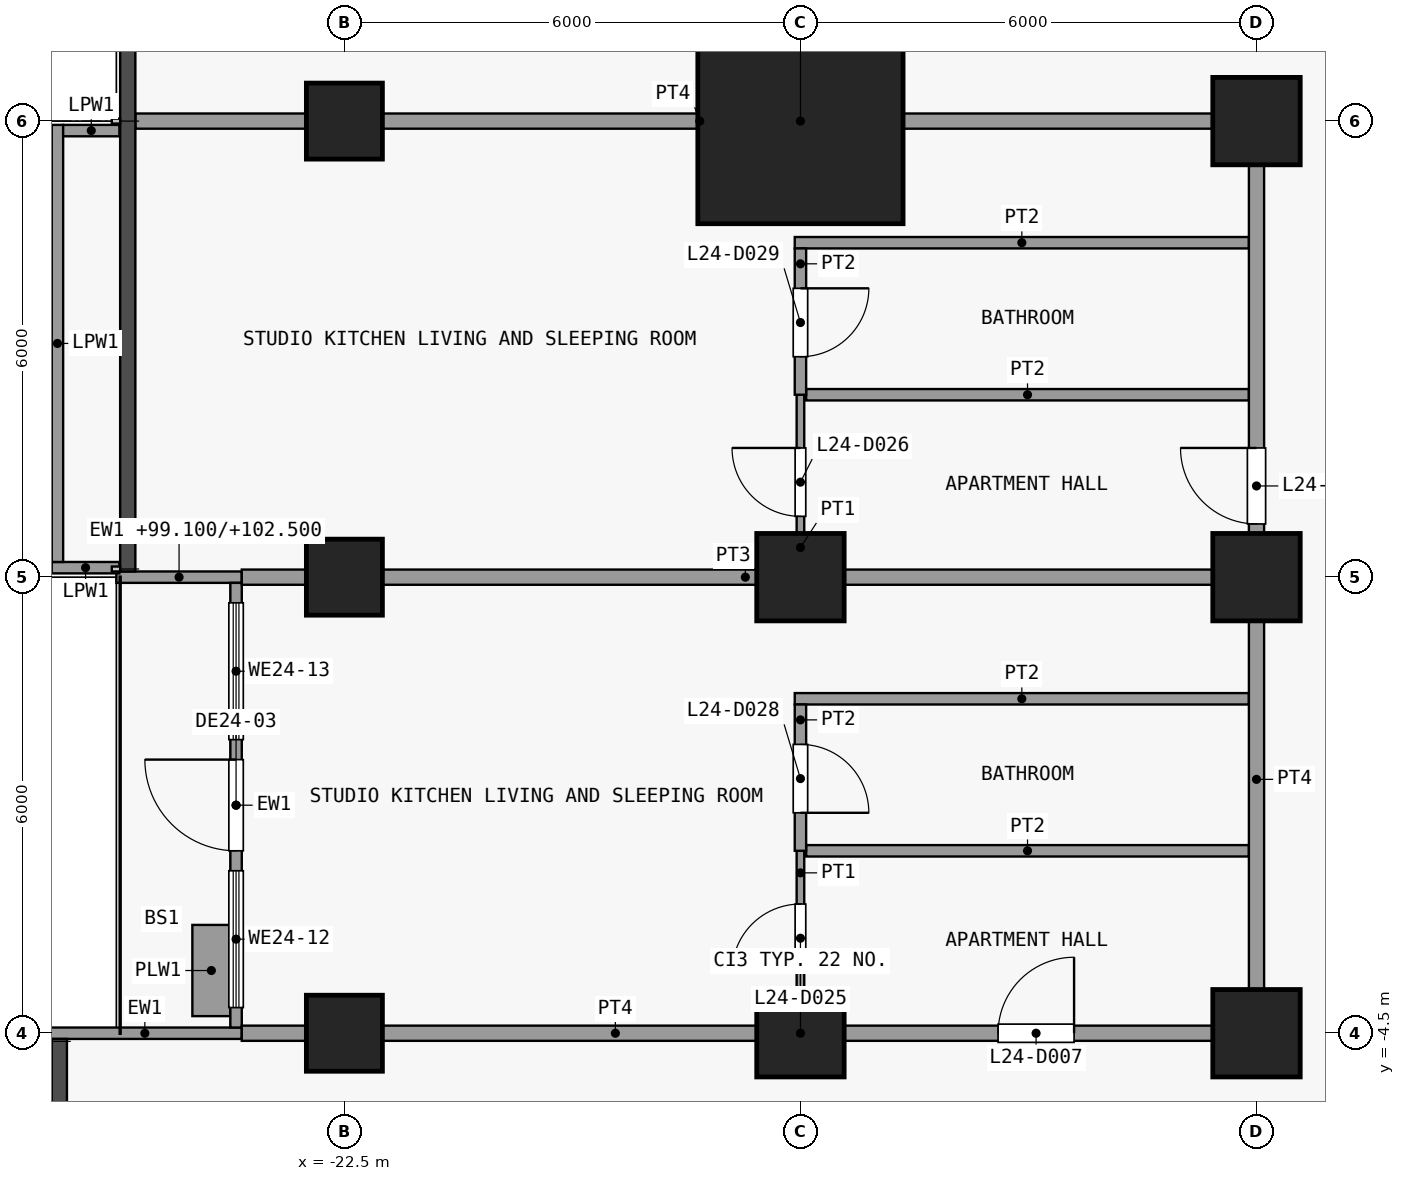
"""IFC4 building model, lengths in metres.
Left out: names, types, materials, properties, quantities, classifications, styles, units other than length and angle.
Written with IfcOpenShell. Run it as: python <this file> out.ifc"""

import sys

from ifc_helpers import new_model, si_unit, direction, frame, frame_2d, origin, origin_2d, place, context, subcontext, project, spatial, rectangle, extrude, element, fill, save


model = new_model("IFC4")
c1 = context("Model", 3, precision=1e-05, world=origin(), true_north=direction((0.0, 1.0)))
c2 = subcontext(c1, "Body", "Model", "MODEL_VIEW")
j1 = project(units=[si_unit("LENGTHUNIT", "METRE"), si_unit("PLANEANGLEUNIT", "RADIAN")], contexts=[c1])
p1 = place(None, origin())
s1 = spatial("IfcSite", under=j1, at=p1, CompositionType="ELEMENT")
p2 = place(p1, origin())
s2 = spatial("IfcBuilding", under=s1, at=p2, CompositionType="ELEMENT")
p3 = place(p2, frame((0.0, 0.0, 99.1)))
s3 = spatial("IfcBuildingStorey", under=s2, at=p3, CompositionType="ELEMENT", Elevation=99.1)
for number, where, z_axis, x_axis in (
    (1, (-22.5, -4.5, 0.0), (0.0, 0.0, 1.0), (1.0, 0.0, 0.0)),
    (2, (-22.5, 1.5, 0.0), (0.0, 0.0, 1.0), (1.0, 0.0, 0.0)),
    (3, (-22.5, 7.5, 0.0), (0.0, 0.0, 1.0), (1.0, 0.0, 0.0)),
):
    element("IfcColumn", number, at=place(p3, frame(where, z_axis=z_axis, x_axis=x_axis)), inside=s3, PredefinedType="COLUMN", context=c2, shape_type="SweptSolid", body=[
        extrude(rectangle(XDim=1.0, YDim=1.0, at=origin_2d()), origin(), (0.0, 0.0, 1.0), 3.6),
    ])
for number, where, z_axis, x_axis in (
    (4, (-16.5, -4.5, 0.0), (0.0, 0.0, 1.0), (1.0, 0.0, 0.0)),
    (5, (-16.5, 1.5, 0.0), (0.0, 0.0, 1.0), (1.0, 0.0, 0.0)),
):
    element("IfcColumn", number, at=place(p3, frame(where, z_axis=z_axis, x_axis=x_axis)), inside=s3, PredefinedType="COLUMN", context=c2, shape_type="SweptSolid", body=[
        extrude(rectangle(XDim=1.15, YDim=1.15, at=origin_2d()), origin(), (0.0, 0.0, 1.0), 3.6),
    ])
p4 = place(p3, frame((-16.5, 7.5, 0.0), z_axis=(0.0, 0.0, 1.0), x_axis=(1.0, 0.0, 0.0)))
e6 = element("IfcColumn", 6, at=p4, inside=s3, PredefinedType="COLUMN", context=c2, shape_type="SweptSolid", body=[
    extrude(rectangle(XDim=2.7, YDim=2.7, at=origin_2d()), origin(), (0.0, 0.0, 1.0), 3.6),
])
for number, where, z_axis, x_axis in (
    (7, (-10.5, -4.5, 0.0), (0.0, 0.0, 1.0), (1.0, 0.0, 0.0)),
    (8, (-10.5, 1.5, 0.0), (0.0, 0.0, 1.0), (1.0, 0.0, 0.0)),
    (9, (-10.5, 7.5, 0.0), (0.0, 0.0, 1.0), (1.0, 0.0, 0.0)),
):
    element("IfcColumn", number, at=place(p3, frame(where, z_axis=z_axis, x_axis=x_axis)), inside=s3, PredefinedType="COLUMN", context=c2, shape_type="SweptSolid", body=[
        extrude(rectangle(XDim=1.15, YDim=1.15, at=origin_2d()), origin(), (0.0, 0.0, 1.0), 3.6),
    ])
p5 = place(p3, frame((-23.85, -4.5, 0.0), z_axis=(0.0, 0.0, 1.0), x_axis=(-1.0, 0.0, 0.0)))
e10 = element("IfcWall", 10, at=p5, inside=s3, PredefinedType="SOLIDWALL", context=c2, shape_type="SweptSolid", body=[
    extrude(rectangle(XDim=2.55, YDim=0.15, at=frame_2d((1.275, 0.0))), origin(), (0.0, 0.0, 1.0), 3.3),
])
p6 = place(p3, frame((-23.85, 1.5, 0.0), z_axis=(0.0, 0.0, 1.0), x_axis=(-1.0, 0.0, 0.0)))
e11 = element("IfcWall", 11, at=p6, inside=s3, PredefinedType="SOLIDWALL", context=c2, shape_type="SweptSolid", body=[
    extrude(rectangle(XDim=1.65, YDim=0.15, at=frame_2d((0.825, 0.0))), origin(), (0.0, 0.0, 1.0), 3.4),
])
p7 = place(p3, frame((-23.925, -4.425, 0.0), z_axis=(0.0, 0.0, 1.0), x_axis=(0.0, 1.0, 0.0)))
e12 = element("IfcWall", 12, at=p7, inside=s3, PredefinedType="SOLIDWALL", context=c2, shape_type="SweptSolid", body=[
    extrude(rectangle(XDim=5.85, YDim=0.15, at=frame_2d((2.925, 0.0))), origin(), (0.0, 0.0, 1.0), 3.3),
])
p8 = place(p7, frame((2.325, 0.0, 0.0)))
e13 = element("IfcOpeningElement", 13, at=p8, cuts=e12, PredefinedType="OPENING", context=c2, shape_type="SweptSolid", body=[
    extrude(rectangle(XDim=1.2, YDim=2.4, at=frame_2d((0.6, 1.2))), frame((0.0, 0.085, 0.0), z_axis=(0.0, -1.0, 0.0), x_axis=(1.0, 0.0, 0.0)), (0.0, 0.0, 1.0), 0.17),
])
p9 = place(p7, frame((0.262, 0.0, 0.9)))
e14 = element("IfcOpeningElement", 14, at=p9, cuts=e12, PredefinedType="OPENING", context=c2, shape_type="SweptSolid", body=[
    extrude(rectangle(XDim=1.8, YDim=2.1, at=frame_2d((0.9, 1.05))), frame((0.0, 0.085, 0.0), z_axis=(0.0, -1.0, 0.0), x_axis=(1.0, 0.0, 0.0)), (0.0, 0.0, 1.0), 0.17),
])
p10 = place(p7, frame((3.788, 0.0, 0.9)))
e15 = element("IfcOpeningElement", 15, at=p10, cuts=e12, PredefinedType="OPENING", context=c2, shape_type="SweptSolid", body=[
    extrude(rectangle(XDim=1.8, YDim=2.1, at=frame_2d((0.9, 1.05))), frame((0.0, 0.085, 0.0), z_axis=(0.0, -1.0, 0.0), x_axis=(1.0, 0.0, 0.0)), (0.0, 0.0, 1.0), 0.17),
])
p11 = place(p3, frame((-24.25, -4.275, 0.0), z_axis=(0.0, 0.0, 1.0), x_axis=(0.0, 1.0, 0.0)))
e16 = element("IfcWall", 16, at=p11, inside=s3, PredefinedType="USERDEFINED", context=c2, shape_type="SweptSolid", body=[
    extrude(rectangle(XDim=1.2, YDim=0.5, at=frame_2d((0.6, 0.0))), origin(), (0.0, 0.0, 1.0), 0.9),
])
p12 = place(p3, frame((-25.46, 1.625, 0.0), z_axis=(0.0, 0.0, 1.0), x_axis=(-1.0, 0.0, 0.0)))
e17 = element("IfcWall", 17, at=p12, inside=s3, PredefinedType="PARAPET", context=c2, shape_type="SweptSolid", body=[
    extrude(rectangle(XDim=0.89, YDim=0.15, at=frame_2d((0.445, 0.0))), origin(), (0.0, 0.0, 1.0), 1.15),
])
p13 = place(p3, frame((-26.275, 1.7, 0.0), z_axis=(0.0, 0.0, 1.0), x_axis=(0.0, 1.0, 0.0)))
e18 = element("IfcWall", 18, at=p13, inside=s3, PredefinedType="PARAPET", context=c2, shape_type="SweptSolid", body=[
    extrude(rectangle(XDim=5.75, YDim=0.15, at=frame_2d((2.875, 0.0))), origin(), (0.0, 0.0, 1.0), 1.15),
])
p14 = place(p3, frame((-26.2, 7.375, 0.0), z_axis=(0.0, 0.0, 1.0), x_axis=(1.0, 0.0, 0.0)))
e19 = element("IfcWall", 19, at=p14, inside=s3, PredefinedType="PARAPET", context=c2, shape_type="SweptSolid", body=[
    extrude(rectangle(XDim=0.74, YDim=0.15, at=frame_2d((0.37, 0.0))), origin(), (0.0, 0.0, 1.0), 1.15),
])
p15 = place(p3, frame((-23.85, -4.5, 0.0), z_axis=(0.0, 0.0, 1.0), x_axis=(1.0, 0.0, 0.0)))
e20 = element("IfcWall", 20, at=p15, inside=s3, PredefinedType="PARTITIONING", context=c2, shape_type="SweptSolid", body=[
    extrude(rectangle(XDim=13.45, YDim=0.2, at=frame_2d((6.725, 0.0))), origin(), (0.0, 0.0, 1.0), 3.3),
])
p16 = place(p15, frame((9.95, 0.0, 0.0)))
e21 = element("IfcOpeningElement", 21, at=p16, cuts=e20, PredefinedType="OPENING", context=c2, shape_type="SweptSolid", body=[
    extrude(rectangle(XDim=1.0, YDim=2.1, at=frame_2d((0.5, 1.05))), frame((0.0, 0.11, 0.0), z_axis=(0.0, -1.0, 0.0), x_axis=(1.0, 0.0, 0.0)), (0.0, 0.0, 1.0), 0.22),
])
p17 = place(p3, frame((-16.425, -2.1, 0.0), z_axis=(0.0, 0.0, 1.0), x_axis=(1.0, 0.0, 0.0)))
e22 = element("IfcWall", 22, at=p17, inside=s3, PredefinedType="PARTITIONING", context=c2, shape_type="SweptSolid", body=[
    extrude(rectangle(XDim=5.825, YDim=0.15, at=frame_2d((2.913, 0.0))), origin(), (0.0, 0.0, 1.0), 3.3),
])
p18 = place(p3, frame((-16.575, -0.1, 0.0), z_axis=(0.0, 0.0, 1.0), x_axis=(1.0, 0.0, 0.0)))
e23 = element("IfcWall", 23, at=p18, inside=s3, PredefinedType="PARTITIONING", context=c2, shape_type="SweptSolid", body=[
    extrude(rectangle(XDim=5.975, YDim=0.15, at=frame_2d((2.987, 0.0))), origin(), (0.0, 0.0, 1.0), 3.3),
])
p19 = place(p3, frame((-23.85, 1.5, 0.0), z_axis=(0.0, 0.0, 1.0), x_axis=(1.0, 0.0, 0.0)))
e24 = element("IfcWall", 24, at=p19, inside=s3, PredefinedType="PARTITIONING", context=c2, shape_type="SweptSolid", body=[
    extrude(rectangle(XDim=13.25, YDim=0.2, at=frame_2d((6.625, 0.0))), origin(), (0.0, 0.0, 1.0), 3.3),
])
p20 = place(p3, frame((-16.425, 3.9, 0.0), z_axis=(0.0, 0.0, 1.0), x_axis=(1.0, 0.0, 0.0)))
e25 = element("IfcWall", 25, at=p20, inside=s3, PredefinedType="PARTITIONING", context=c2, shape_type="SweptSolid", body=[
    extrude(rectangle(XDim=5.825, YDim=0.15, at=frame_2d((2.913, 0.0))), origin(), (0.0, 0.0, 1.0), 3.3),
])
p21 = place(p3, frame((-16.575, 5.9, 0.0), z_axis=(0.0, 0.0, 1.0), x_axis=(1.0, 0.0, 0.0)))
e26 = element("IfcWall", 26, at=p21, inside=s3, PredefinedType="PARTITIONING", context=c2, shape_type="SweptSolid", body=[
    extrude(rectangle(XDim=5.975, YDim=0.15, at=frame_2d((2.987, 0.0))), origin(), (0.0, 0.0, 1.0), 3.3),
])
p22 = place(p3, frame((-25.25, 7.5, 0.0), z_axis=(0.0, 0.0, 1.0), x_axis=(1.0, 0.0, 0.0)))
e27 = element("IfcWall", 27, at=p22, inside=s3, PredefinedType="PARTITIONING", context=c2, shape_type="SweptSolid", body=[
    extrude(rectangle(XDim=14.85, YDim=0.2, at=frame_2d((7.425, 0.0))), origin(), (0.0, 0.0, 1.0), 3.3),
])
p23 = place(p3, frame((-16.5, -4.4, 0.0), z_axis=(0.0, 0.0, 1.0), x_axis=(0.0, 1.0, 0.0)))
e28 = element("IfcWall", 28, at=p23, inside=s3, PredefinedType="PARTITIONING", context=c2, shape_type="SweptSolid", body=[
    extrude(rectangle(XDim=2.3, YDim=0.1, at=frame_2d((1.15, 0.0))), origin(), (0.0, 0.0, 1.0), 3.3),
])
p24 = place(p23, frame((0.7, 0.0, 0.0)))
e29 = element("IfcOpeningElement", 29, at=p24, cuts=e28, PredefinedType="OPENING", context=c2, shape_type="SweptSolid", body=[
    extrude(rectangle(XDim=0.9, YDim=2.1, at=frame_2d((0.45, 1.05))), frame((0.0, 0.06, 0.0), z_axis=(0.0, -1.0, 0.0), x_axis=(1.0, 0.0, 0.0)), (0.0, 0.0, 1.0), 0.12),
])
p25 = place(p3, frame((-16.5, 1.6, 0.0), z_axis=(0.0, 0.0, 1.0), x_axis=(0.0, 1.0, 0.0)))
e30 = element("IfcWall", 30, at=p25, inside=s3, PredefinedType="PARTITIONING", context=c2, shape_type="SweptSolid", body=[
    extrude(rectangle(XDim=2.3, YDim=0.1, at=frame_2d((1.15, 0.0))), origin(), (0.0, 0.0, 1.0), 3.3),
])
p26 = place(p25, frame((0.7, 0.0, 0.0)))
e31 = element("IfcOpeningElement", 31, at=p26, cuts=e30, PredefinedType="OPENING", context=c2, shape_type="SweptSolid", body=[
    extrude(rectangle(XDim=0.9, YDim=2.1, at=frame_2d((0.45, 1.05))), frame((0.0, 0.06, 0.0), z_axis=(0.0, -1.0, 0.0), x_axis=(1.0, 0.0, 0.0)), (0.0, 0.0, 1.0), 0.12),
])
p27 = place(p3, frame((-16.5, -2.1, 0.0), z_axis=(0.0, 0.0, 1.0), x_axis=(0.0, 1.0, 0.0)))
e32 = element("IfcWall", 32, at=p27, inside=s3, PredefinedType="PARTITIONING", context=c2, shape_type="SweptSolid", body=[
    extrude(rectangle(XDim=1.925, YDim=0.15, at=frame_2d((0.962, 0.0))), origin(), (0.0, 0.0, 1.0), 3.3),
])
p28 = place(p27, frame((0.5, 0.0, 0.0)))
e33 = element("IfcOpeningElement", 33, at=p28, cuts=e32, PredefinedType="OPENING", context=c2, shape_type="SweptSolid", body=[
    extrude(rectangle(XDim=0.9, YDim=2.1, at=frame_2d((0.45, 1.05))), frame((0.0, 0.085, 0.0), z_axis=(0.0, -1.0, 0.0), x_axis=(1.0, 0.0, 0.0)), (0.0, 0.0, 1.0), 0.17),
])
p29 = place(p3, frame((-16.5, 3.9, 0.0), z_axis=(0.0, 0.0, 1.0), x_axis=(0.0, 1.0, 0.0)))
e34 = element("IfcWall", 34, at=p29, inside=s3, PredefinedType="PARTITIONING", context=c2, shape_type="SweptSolid", body=[
    extrude(rectangle(XDim=1.925, YDim=0.15, at=frame_2d((0.962, 0.0))), origin(), (0.0, 0.0, 1.0), 3.3),
])
p30 = place(p29, frame((0.5, 0.0, 0.0)))
e35 = element("IfcOpeningElement", 35, at=p30, cuts=e34, PredefinedType="OPENING", context=c2, shape_type="SweptSolid", body=[
    extrude(rectangle(XDim=0.9, YDim=2.1, at=frame_2d((0.45, 1.05))), frame((0.0, 0.085, 0.0), z_axis=(0.0, -1.0, 0.0), x_axis=(1.0, 0.0, 0.0)), (0.0, 0.0, 1.0), 0.17),
])
p31 = place(p3, frame((-10.5, -4.4, 0.0), z_axis=(0.0, 0.0, 1.0), x_axis=(0.0, 1.0, 0.0)))
e36 = element("IfcWall", 36, at=p31, inside=s3, PredefinedType="PARTITIONING", context=c2, shape_type="SweptSolid", body=[
    extrude(rectangle(XDim=11.8, YDim=0.2, at=frame_2d((5.9, 0.0))), origin(), (0.0, 0.0, 1.0), 3.3),
])
p32 = place(p31, frame((6.6, 0.0, 0.0)))
e37 = element("IfcOpeningElement", 37, at=p32, cuts=e36, PredefinedType="OPENING", context=c2, shape_type="SweptSolid", body=[
    extrude(rectangle(XDim=1.0, YDim=2.1, at=frame_2d((0.5, 1.05))), frame((0.0, 0.11, 0.0), z_axis=(0.0, -1.0, 0.0), x_axis=(1.0, 0.0, 0.0)), (0.0, 0.0, 1.0), 0.22),
])
p33 = place(p8, origin())
e38 = element("IfcDoor", 38, at=p33, inside=s3, OperationType="SINGLE_SWING_RIGHT", PredefinedType="DOOR", context=c2, shape_type="SweptSolid", body=[
    extrude(rectangle(XDim=1.2, YDim=2.4, at=frame_2d((0.6, 1.2))), frame((0.0, 0.025, 0.0), z_axis=(0.0, -1.0, 0.0), x_axis=(1.0, 0.0, 0.0)), (0.0, 0.0, 1.0), 0.05),
])
fill(e13, e38)
p34 = place(p9, origin())
e39 = element("IfcWindow", 39, at=p34, inside=s3, PartitioningType="SINGLE_PANEL", PredefinedType="WINDOW", context=c2, shape_type="SweptSolid", body=[
    extrude(rectangle(XDim=1.8, YDim=2.1, at=frame_2d((0.9, 1.05))), frame((0.0, 0.03, 0.0), z_axis=(0.0, -1.0, 0.0), x_axis=(1.0, 0.0, 0.0)), (0.0, 0.0, 1.0), 0.06),
])
fill(e14, e39)
p35 = place(p10, origin())
e40 = element("IfcWindow", 40, at=p35, inside=s3, PartitioningType="SINGLE_PANEL", PredefinedType="WINDOW", context=c2, shape_type="SweptSolid", body=[
    extrude(rectangle(XDim=1.8, YDim=2.1, at=frame_2d((0.9, 1.05))), frame((0.0, 0.03, 0.0), z_axis=(0.0, -1.0, 0.0), x_axis=(1.0, 0.0, 0.0)), (0.0, 0.0, 1.0), 0.06),
])
fill(e15, e40)
p36 = place(p16, origin())
e41 = element("IfcDoor", 41, at=p36, inside=s3, OperationType="SINGLE_SWING_LEFT", PredefinedType="DOOR", context=c2, shape_type="SweptSolid", body=[
    extrude(rectangle(XDim=1.0, YDim=2.1, at=frame_2d((0.5, 1.05))), frame((0.0, 0.025, 0.0), z_axis=(0.0, -1.0, 0.0), x_axis=(1.0, 0.0, 0.0)), (0.0, 0.0, 1.0), 0.05),
])
fill(e21, e41)
p37 = place(p24, origin())
e42 = element("IfcDoor", 42, at=p37, inside=s3, OperationType="SINGLE_SWING_RIGHT", PredefinedType="DOOR", context=c2, shape_type="SweptSolid", body=[
    extrude(rectangle(XDim=0.9, YDim=2.1, at=frame_2d((0.45, 1.05))), frame((0.0, 0.025, 0.0), z_axis=(0.0, -1.0, 0.0), x_axis=(1.0, 0.0, 0.0)), (0.0, 0.0, 1.0), 0.05),
])
fill(e29, e42)
p38 = place(p26, origin())
e43 = element("IfcDoor", 43, at=p38, inside=s3, OperationType="SINGLE_SWING_LEFT", PredefinedType="DOOR", context=c2, shape_type="SweptSolid", body=[
    extrude(rectangle(XDim=0.9, YDim=2.1, at=frame_2d((0.45, 1.05))), frame((0.0, 0.025, 0.0), z_axis=(0.0, -1.0, 0.0), x_axis=(1.0, 0.0, 0.0)), (0.0, 0.0, 1.0), 0.05),
])
fill(e31, e43)
p39 = place(p28, origin())
e44 = element("IfcDoor", 44, at=p39, inside=s3, OperationType="SINGLE_SWING_LEFT", PredefinedType="DOOR", context=c2, shape_type="SweptSolid", body=[
    extrude(rectangle(XDim=0.9, YDim=2.1, at=frame_2d((0.45, 1.05))), frame((0.0, 0.025, 0.0), z_axis=(0.0, -1.0, 0.0), x_axis=(1.0, 0.0, 0.0)), (0.0, 0.0, 1.0), 0.05),
])
fill(e33, e44)
p40 = place(p30, origin())
e45 = element("IfcDoor", 45, at=p40, inside=s3, OperationType="SINGLE_SWING_RIGHT", PredefinedType="DOOR", context=c2, shape_type="SweptSolid", body=[
    extrude(rectangle(XDim=0.9, YDim=2.1, at=frame_2d((0.45, 1.05))), frame((0.0, 0.025, 0.0), z_axis=(0.0, -1.0, 0.0), x_axis=(1.0, 0.0, 0.0)), (0.0, 0.0, 1.0), 0.05),
])
fill(e35, e45)
p41 = place(p32, origin())
e46 = element("IfcDoor", 46, at=p41, inside=s3, OperationType="SINGLE_SWING_LEFT", PredefinedType="DOOR", context=c2, shape_type="SweptSolid", body=[
    extrude(rectangle(XDim=1.0, YDim=2.1, at=frame_2d((0.5, 1.05))), frame((0.0, 0.025, 0.0), z_axis=(0.0, -1.0, 0.0), x_axis=(1.0, 0.0, 0.0)), (0.0, 0.0, 1.0), 0.05),
])
fill(e37, e46)
save(model, sys.argv[1])
